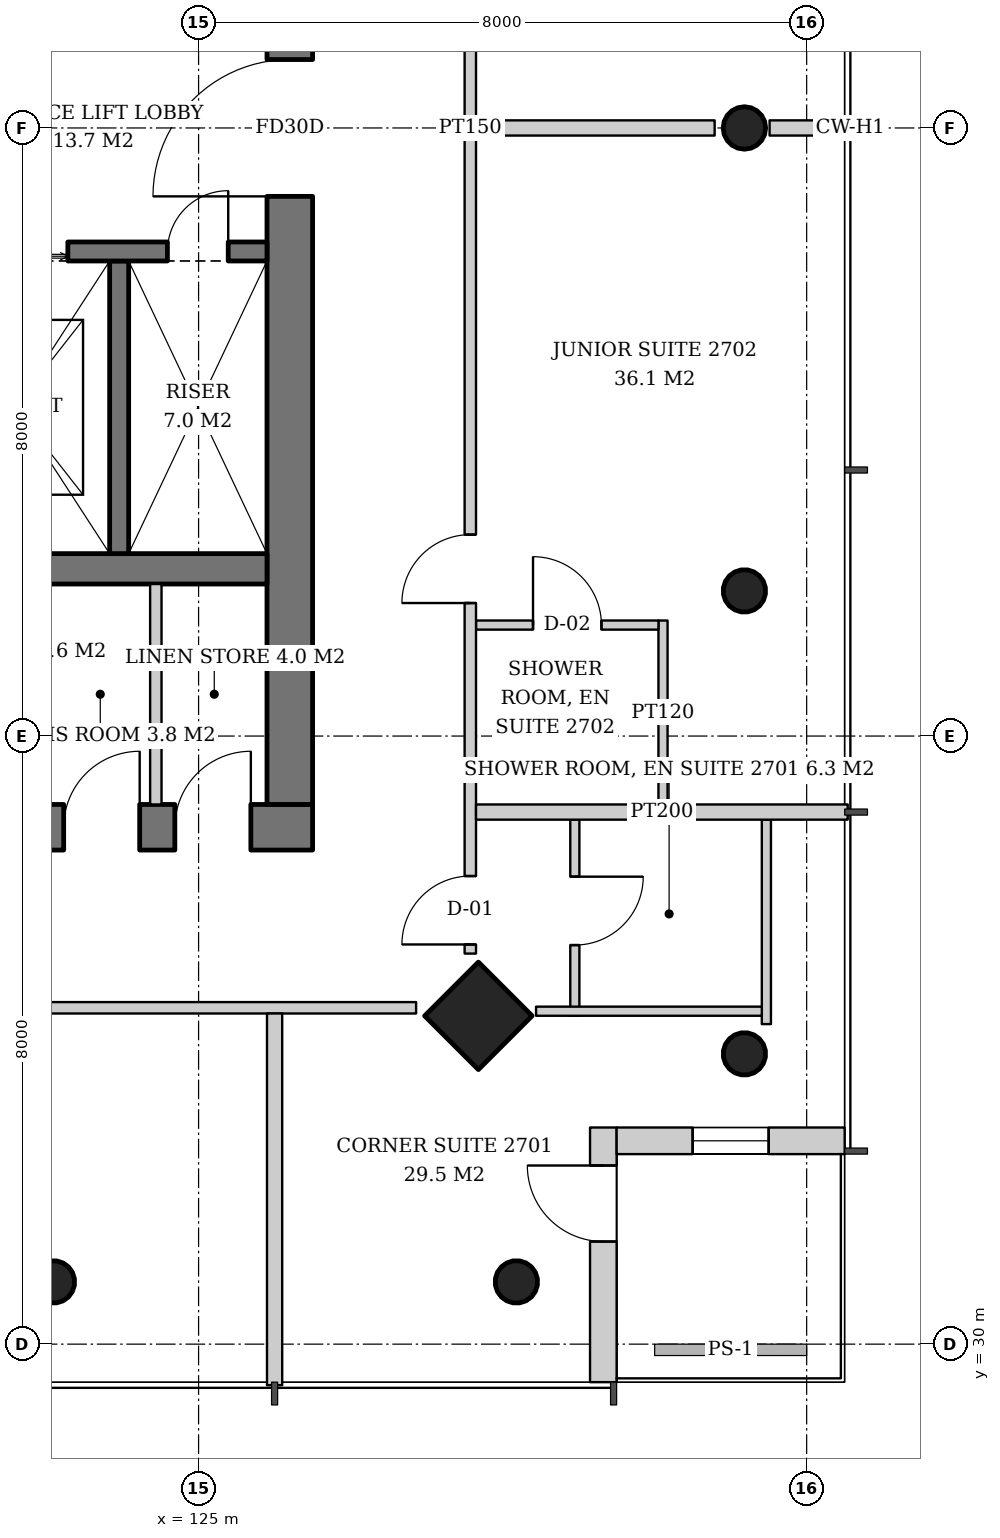
"""IFC4 building model, lengths in metres.
Left out: names, types, materials, properties, quantities, classifications, styles, units other than length and angle.
Written with IfcOpenShell. Run it as: python <this file> out.ifc"""

import sys

from ifc_helpers import new_model, si_unit, direction, frame, frame_2d, origin, origin_2d, place, context, subcontext, project, spatial, rectangle, hollow_circle, extrude, element, fill, save


model = new_model("IFC4")
c1 = context("Model", 3, precision=1e-05, world=origin(), true_north=direction((0.0, 1.0)))
c2 = subcontext(c1, "Body", "Model", "MODEL_VIEW")
j1 = project(units=[si_unit("LENGTHUNIT", "METRE"), si_unit("PLANEANGLEUNIT", "RADIAN")], contexts=[c1])
p1 = place(None, origin())
s1 = spatial("IfcSite", under=j1, at=p1, CompositionType="ELEMENT")
p2 = place(p1, origin())
s2 = spatial("IfcBuilding", under=s1, at=p2, CompositionType="ELEMENT")
p3 = place(p2, frame((0.0, 0.0, 108.4)))
s3 = spatial("IfcBuildingStorey", under=s2, at=p3, CompositionType="ELEMENT", Elevation=108.4)
p4 = place(p3, frame((132.233, 33.767, 0.0), z_axis=(-0.043029647111, 0.043029647111, 0.998146732169), x_axis=(-0.707106781187, -0.707106781187, 0.0)))
e1 = element("IfcColumn", 1, at=p4, inside=s3, PredefinedType="COLUMN", context=c2, shape_type="SweptSolid", body=[
    extrude(hollow_circle(Radius=0.28, WallThickness=0.02, at=origin_2d()), origin(), (0.0, 0.0, 1.0), 3.807),
])
p5 = place(p3, frame((132.233, 39.884, 0.0), z_axis=(-0.043059525333, 0.021561848751, 0.998839808957), x_axis=(-0.44774654769, -0.894160516368, 0.0)))
e2 = element("IfcColumn", 2, at=p5, inside=s3, PredefinedType="COLUMN", context=c2, shape_type="SweptSolid", body=[
    extrude(hollow_circle(Radius=0.28, WallThickness=0.02, at=origin_2d()), origin(), (0.0, 0.0, 1.0), 3.804),
])
p6 = place(p3, frame((132.233, 46.0, 0.0), z_axis=(-0.043069538298, 0.0, 0.999072076915), x_axis=(0.0, -1.0, 0.0)))
e3 = element("IfcColumn", 3, at=p6, inside=s3, PredefinedType="COLUMN", context=c2, shape_type="SweptSolid", body=[
    extrude(hollow_circle(Radius=0.28, WallThickness=0.02, at=origin_2d()), origin(), (0.0, 0.0, 1.0), 3.803),
])
p7 = place(p3, frame((128.733, 34.267, 0.0), z_axis=(-0.043029647111, 0.043029647111, 0.998146732169), x_axis=(-0.707106781187, -0.707106781187, 0.0)))
e4 = element("IfcColumn", 4, at=p7, inside=s3, PredefinedType="COLUMN", context=c2, shape_type="SweptSolid", body=[
    extrude(rectangle(XDim=1.0, YDim=1.0, at=origin_2d()), origin(), (0.0, 0.0, 1.0), 3.807),
])
p8 = place(p3, frame((129.233, 30.767, 0.0), z_axis=(-0.043029647111, 0.043029647111, 0.998146732169), x_axis=(-0.707106781187, -0.707106781187, 0.0)))
e5 = element("IfcColumn", 5, at=p8, inside=s3, PredefinedType="COLUMN", context=c2, shape_type="SweptSolid", body=[
    extrude(hollow_circle(Radius=0.28, WallThickness=0.02, at=origin_2d()), origin(), (0.0, 0.0, 1.0), 3.807),
])
p9 = place(p3, frame((123.116, 30.767, 0.0), z_axis=(-0.021561848751, 0.043059525333, 0.998839808957), x_axis=(-0.894160516368, -0.44774654769, 0.0)))
e6 = element("IfcColumn", 6, at=p9, inside=s3, PredefinedType="COLUMN", context=c2, shape_type="SweptSolid", body=[
    extrude(hollow_circle(Radius=0.28, WallThickness=0.02, at=origin_2d()), origin(), (0.0, 0.0, 1.0), 3.804),
])
p10 = place(p3, frame((107.5, 36.8, 0.0), z_axis=(0.0, 0.0, 1.0), x_axis=(1.0, 0.0, 0.0)))
e7 = element("IfcWall", 7, at=p10, inside=s3, PredefinedType="SHEAR", context=c2, shape_type="SweptSolid", body=[
    extrude(rectangle(XDim=19.0, YDim=0.6, at=frame_2d((9.5, 0.0))), origin(), (0.0, 0.0, 1.0), 3.8),
])
p11 = place(p10, frame((3.9, 0.0, 0.0)))
e8 = element("IfcOpeningElement", 8, at=p11, cuts=e7, PredefinedType="OPENING", context=c2, shape_type="SweptSolid", body=[
    extrude(rectangle(XDim=1.0, YDim=2.1, at=frame_2d((0.5, 1.05))), frame((0.0, 0.31, 0.0), z_axis=(0.0, -1.0, 0.0), x_axis=(1.0, 0.0, 0.0)), (0.0, 0.0, 1.0), 0.62),
])
p12 = place(p10, frame((14.153, 0.0, 0.0)))
e9 = element("IfcOpeningElement", 9, at=p12, cuts=e7, PredefinedType="OPENING", context=c2, shape_type="SweptSolid", body=[
    extrude(rectangle(XDim=1.0, YDim=2.1, at=frame_2d((0.5, 1.05))), frame((0.0, 0.31, 0.0), z_axis=(0.0, -1.0, 0.0), x_axis=(1.0, 0.0, 0.0)), (0.0, 0.0, 1.0), 0.62),
])
p13 = place(p10, frame((15.725, 0.0, 0.0)))
e10 = element("IfcOpeningElement", 10, at=p13, cuts=e7, PredefinedType="OPENING", context=c2, shape_type="SweptSolid", body=[
    extrude(rectangle(XDim=1.0, YDim=2.1, at=frame_2d((0.5, 1.05))), frame((0.0, 0.31, 0.0), z_axis=(0.0, -1.0, 0.0), x_axis=(1.0, 0.0, 0.0)), (0.0, 0.0, 1.0), 0.62),
])
p14 = place(p10, frame((17.188, 0.0, 0.0)))
e11 = element("IfcOpeningElement", 11, at=p14, cuts=e7, PredefinedType="OPENING", context=c2, shape_type="SweptSolid", body=[
    extrude(rectangle(XDim=1.0, YDim=2.1, at=frame_2d((0.5, 1.05))), frame((0.0, 0.31, 0.0), z_axis=(0.0, -1.0, 0.0), x_axis=(1.0, 0.0, 0.0)), (0.0, 0.0, 1.0), 0.62),
])
p15 = place(p3, frame((126.2, 37.1, 0.0), z_axis=(0.0, 0.0, 1.0), x_axis=(0.0, 1.0, 0.0)))
e12 = element("IfcWall", 12, at=p15, inside=s3, PredefinedType="SHEAR", context=c2, shape_type="SweptSolid", body=[
    extrude(rectangle(XDim=17.8, YDim=0.6, at=frame_2d((8.9, 0.0))), origin(), (0.0, 0.0, 1.0), 3.8),
])
p16 = place(p15, frame((8.0, 0.0, 0.0)))
e13 = element("IfcOpeningElement", 13, at=p16, cuts=e12, PredefinedType="OPENING", context=c2, shape_type="SweptSolid", body=[
    extrude(rectangle(XDim=1.8, YDim=2.4, at=frame_2d((0.9, 1.2))), frame((0.0, 0.31, 0.0), z_axis=(0.0, -1.0, 0.0), x_axis=(1.0, 0.0, 0.0)), (0.0, 0.0, 1.0), 0.62),
])
p17 = place(p3, frame((108.1, 40.2, 0.0), z_axis=(0.0, 0.0, 1.0), x_axis=(1.0, 0.0, 0.0)))
e14 = element("IfcWall", 14, at=p17, inside=s3, PredefinedType="SHEAR", context=c2, shape_type="SweptSolid", body=[
    extrude(rectangle(XDim=17.8, YDim=0.4, at=frame_2d((8.9, 0.0))), origin(), (0.0, 0.0, 1.0), 3.8),
])
p18 = place(p3, frame((130.325, 29.5, 0.0), z_axis=(0.0, 0.0, 1.0), x_axis=(0.0, 1.0, 0.0)))
e15 = element("IfcWall", 15, at=p18, inside=s3, PredefinedType="SOLIDWALL", context=c2, shape_type="SweptSolid", body=[
    extrude(rectangle(XDim=3.35, YDim=0.35, at=frame_2d((1.675, 0.0))), origin(), (0.0, 0.0, 1.0), 3.6),
])
p19 = place(p18, frame((1.85, 0.0, 0.0)))
e16 = element("IfcOpeningElement", 16, at=p19, cuts=e15, PredefinedType="OPENING", context=c2, shape_type="SweptSolid", body=[
    extrude(rectangle(XDim=1.0, YDim=2.4, at=frame_2d((0.5, 1.2))), frame((0.0, 0.185, 0.0), z_axis=(0.0, -1.0, 0.0), x_axis=(1.0, 0.0, 0.0)), (0.0, 0.0, 1.0), 0.37),
])
p20 = place(p3, frame((130.5, 32.675, 0.0), z_axis=(0.0, 0.0, 1.0), x_axis=(1.0, 0.0, 0.0)))
e17 = element("IfcWall", 17, at=p20, inside=s3, PredefinedType="SOLIDWALL", context=c2, shape_type="SweptSolid", body=[
    extrude(rectangle(XDim=3.0, YDim=0.35, at=frame_2d((1.5, 0.0))), origin(), (0.0, 0.0, 1.0), 3.6),
])
p21 = place(p20, frame((1.0, 0.0, 0.9)))
e18 = element("IfcOpeningElement", 18, at=p21, cuts=e17, PredefinedType="OPENING", context=c2, shape_type="SweptSolid", body=[
    extrude(rectangle(XDim=1.0, YDim=2.4, at=frame_2d((0.5, 1.2))), frame((0.0, 0.185, 0.0), z_axis=(0.0, -1.0, 0.0), x_axis=(1.0, 0.0, 0.0)), (0.0, 0.0, 1.0), 0.37),
])
p22 = place(p3, frame((123.955, 44.25, 0.0), z_axis=(0.0, 0.0, 1.0), x_axis=(0.0, -1.0, 0.0)))
e19 = element("IfcWall", 19, at=p22, inside=s3, PredefinedType="SHEAR", context=c2, shape_type="SweptSolid", body=[
    extrude(rectangle(XDim=3.85, YDim=0.25, at=frame_2d((1.925, 0.0))), origin(), (0.0, 0.0, 1.0), 3.8),
])
p23 = place(p3, frame((121.33, 44.375, 0.0), z_axis=(0.0, 0.0, 1.0), x_axis=(1.0, 0.0, 0.0)))
e20 = element("IfcWall", 20, at=p23, inside=s3, PredefinedType="SHEAR", context=c2, shape_type="SweptSolid", body=[
    extrude(rectangle(XDim=4.57, YDim=0.25, at=frame_2d((2.285, 0.0))), origin(), (0.0, 0.0, 1.0), 3.8),
])
p24 = place(p23, frame((0.55, 0.0, 0.0)))
e21 = element("IfcOpeningElement", 21, at=p24, cuts=e20, PredefinedType="OPENING", context=c2, shape_type="SweptSolid", body=[
    extrude(rectangle(XDim=1.4, YDim=2.4, at=frame_2d((0.7, 1.2))), frame((0.0, 0.135, 0.0), z_axis=(0.0, -1.0, 0.0), x_axis=(1.0, 0.0, 0.0)), (0.0, 0.0, 1.0), 0.27),
])
p25 = place(p23, frame((3.26, 0.0, 0.0)))
e22 = element("IfcOpeningElement", 22, at=p25, cuts=e20, PredefinedType="OPENING", context=c2, shape_type="SweptSolid", body=[
    extrude(rectangle(XDim=0.8, YDim=2.0, at=frame_2d((0.4, 1.0))), frame((0.0, 0.135, 0.0), z_axis=(0.0, -1.0, 0.0), x_axis=(1.0, 0.0, 0.0)), (0.0, 0.0, 1.0), 0.27),
])
p26 = place(p3, frame((124.438, 37.1, 0.0), z_axis=(0.0, 0.0, 1.0), x_axis=(0.0, 1.0, 0.0)))
e23 = element("IfcWall", 23, at=p26, inside=s3, PredefinedType="SOLIDWALL", context=c2, shape_type="SweptSolid", body=[
    extrude(rectangle(XDim=2.9, YDim=0.15, at=frame_2d((1.45, 0.0))), origin(), (0.0, 0.0, 1.0), 3.6),
])
p27 = place(p3, frame((129.95, 36.9, 0.0), z_axis=(0.0, 0.0, 1.0), x_axis=(0.0, -1.0, 0.0)))
e24 = element("IfcWall", 24, at=p27, inside=s3, PredefinedType="PARTITIONING", context=c2, shape_type="SweptSolid", body=[
    extrude(rectangle(XDim=2.58, YDim=0.12, at=frame_2d((1.29, 0.0))), origin(), (0.0, 0.0, 1.0), 2.9),
])
p28 = place(p27, frame((0.75, 0.0, 0.0)))
e25 = element("IfcOpeningElement", 25, at=p28, cuts=e24, PredefinedType="OPENING", context=c2, shape_type="SweptSolid", body=[
    extrude(rectangle(XDim=0.9, YDim=2.1, at=frame_2d((0.45, 1.05))), frame((0.0, 0.07, 0.0), z_axis=(0.0, -1.0, 0.0), x_axis=(1.0, 0.0, 0.0)), (0.0, 0.0, 1.0), 0.14),
])
p29 = place(p3, frame((132.47, 36.9, 0.0), z_axis=(0.0, 0.0, 1.0), x_axis=(0.0, -1.0, 0.0)))
e26 = element("IfcWall", 26, at=p29, inside=s3, PredefinedType="PARTITIONING", context=c2, shape_type="SweptSolid", body=[
    extrude(rectangle(XDim=2.689, YDim=0.12, at=frame_2d((1.345, 0.0))), origin(), (0.0, 0.0, 1.0), 3.6),
])
p30 = place(p3, frame((129.44, 34.38, 0.0), z_axis=(0.0, 0.0, 1.0), x_axis=(1.0, 0.0, 0.0)))
e27 = element("IfcWall", 27, at=p30, inside=s3, PredefinedType="PARTITIONING", context=c2, shape_type="SweptSolid", body=[
    extrude(rectangle(XDim=2.97, YDim=0.12, at=frame_2d((1.485, 0.0))), origin(), (0.0, 0.0, 1.0), 3.2),
])
p31 = place(p3, frame((131.11, 37.1, 0.0), z_axis=(0.0, 0.0, 1.0), x_axis=(0.0, 1.0, 0.0)))
e28 = element("IfcWall", 28, at=p31, inside=s3, PredefinedType="PARTITIONING", context=c2, shape_type="SweptSolid", body=[
    extrude(rectangle(XDim=2.42, YDim=0.12, at=frame_2d((1.21, 0.0))), origin(), (0.0, 0.0, 1.0), 3.6),
])
p32 = place(p3, frame((128.65, 39.46, 0.0), z_axis=(0.0, 0.0, 1.0), x_axis=(1.0, 0.0, 0.0)))
e29 = element("IfcWall", 29, at=p32, inside=s3, PredefinedType="PARTITIONING", context=c2, shape_type="SweptSolid", body=[
    extrude(rectangle(XDim=2.4, YDim=0.12, at=frame_2d((1.2, 0.0))), origin(), (0.0, 0.0, 1.0), 3.6),
])
p33 = place(p32, frame((0.75, 0.0, 0.0)))
e30 = element("IfcOpeningElement", 30, at=p33, cuts=e29, PredefinedType="OPENING", context=c2, shape_type="SweptSolid", body=[
    extrude(rectangle(XDim=0.9, YDim=2.1, at=frame_2d((0.45, 1.05))), frame((0.0, 0.07, 0.0), z_axis=(0.0, -1.0, 0.0), x_axis=(1.0, 0.0, 0.0)), (0.0, 0.0, 1.0), 0.14),
])
p34 = place(p3, frame((128.575, 35.138, 0.0), z_axis=(0.0, 0.0, 1.0), x_axis=(0.0, 1.0, 0.0)))
e31 = element("IfcWall", 31, at=p34, inside=s3, PredefinedType="PARTITIONING", context=c2, shape_type="SweptSolid", body=[
    extrude(rectangle(XDim=21.724, YDim=0.15, at=frame_2d((10.862, 0.0))), origin(), (0.0, 0.0, 1.0), 2.9),
])
p35 = place(p34, frame((0.12, 0.0, 0.0)))
e32 = element("IfcOpeningElement", 32, at=p35, cuts=e31, PredefinedType="OPENING", context=c2, shape_type="SweptSolid", body=[
    extrude(rectangle(XDim=0.9, YDim=2.1, at=frame_2d((0.45, 1.05))), frame((0.0, 0.085, 0.0), z_axis=(0.0, -1.0, 0.0), x_axis=(1.0, 0.0, 0.0)), (0.0, 0.0, 1.0), 0.17),
])
p36 = place(p34, frame((4.612, 0.0, 0.0)))
e33 = element("IfcOpeningElement", 33, at=p36, cuts=e31, PredefinedType="OPENING", context=c2, shape_type="SweptSolid", body=[
    extrude(rectangle(XDim=0.9, YDim=2.1, at=frame_2d((0.45, 1.05))), frame((0.0, 0.085, 0.0), z_axis=(0.0, -1.0, 0.0), x_axis=(1.0, 0.0, 0.0)), (0.0, 0.0, 1.0), 0.17),
])
p37 = place(p34, frame((13.562, 0.0, 0.0)))
e34 = element("IfcOpeningElement", 34, at=p37, cuts=e31, PredefinedType="OPENING", context=c2, shape_type="SweptSolid", body=[
    extrude(rectangle(XDim=1.0, YDim=2.1, at=frame_2d((0.5, 1.05))), frame((0.0, 0.085, 0.0), z_axis=(0.0, -1.0, 0.0), x_axis=(1.0, 0.0, 0.0)), (0.0, 0.0, 1.0), 0.17),
])
p38 = place(p3, frame((128.65, 37.0, 0.0), z_axis=(0.0, 0.0, 1.0), x_axis=(1.0, 0.0, 0.0)))
e35 = element("IfcWall", 35, at=p38, inside=s3, PredefinedType="PARTITIONING", context=c2, shape_type="SweptSolid", body=[
    extrude(rectangle(XDim=4.89, YDim=0.2, at=frame_2d((2.445, 0.0))), origin(), (0.0, 0.0, 1.0), 2.9),
])
p39 = place(p3, frame((128.65, 46.0, 0.0), z_axis=(0.0, 0.0, 1.0), x_axis=(1.0, 0.0, 0.0)))
e36 = element("IfcWall", 36, at=p39, inside=s3, PredefinedType="PARTITIONING", context=c2, shape_type="SweptSolid", body=[
    extrude(rectangle(XDim=3.14, YDim=0.2, at=frame_2d((1.57, 0.0))), origin(), (0.0, 0.0, 1.0), 3.6),
])
p40 = place(p3, frame((132.512, 46.0, 0.0), z_axis=(0.0, 0.0, 1.0), x_axis=(1.0, 0.0, 0.0)))
e37 = element("IfcWall", 37, at=p40, inside=s3, PredefinedType="PARTITIONING", context=c2, shape_type="SweptSolid", body=[
    extrude(rectangle(XDim=1.028, YDim=0.2, at=frame_2d((0.514, 0.0))), origin(), (0.0, 0.0, 1.0), 3.6),
])
p41 = place(p3, frame((106.138, 34.425, 0.0), z_axis=(0.0, 0.0, 1.0), x_axis=(1.0, 0.0, 0.0)))
e38 = element("IfcWall", 38, at=p41, inside=s3, PredefinedType="PARTITIONING", context=c2, shape_type="SweptSolid", body=[
    extrude(rectangle(XDim=21.724, YDim=0.15, at=frame_2d((10.862, 0.0))), origin(), (0.0, 0.0, 1.0), 2.9),
])
p42 = place(p41, frame((0.12, 0.0, 0.0)))
e39 = element("IfcOpeningElement", 39, at=p42, cuts=e38, PredefinedType="OPENING", context=c2, shape_type="SweptSolid", body=[
    extrude(rectangle(XDim=0.9, YDim=2.1, at=frame_2d((0.45, 1.05))), frame((0.0, 0.085, 0.0), z_axis=(0.0, -1.0, 0.0), x_axis=(1.0, 0.0, 0.0)), (0.0, 0.0, 1.0), 0.17),
])
p43 = place(p41, frame((4.562, 0.0, 0.0)))
e40 = element("IfcOpeningElement", 40, at=p43, cuts=e38, PredefinedType="OPENING", context=c2, shape_type="SweptSolid", body=[
    extrude(rectangle(XDim=1.0, YDim=2.1, at=frame_2d((0.5, 1.05))), frame((0.0, 0.085, 0.0), z_axis=(0.0, -1.0, 0.0), x_axis=(1.0, 0.0, 0.0)), (0.0, 0.0, 1.0), 0.17),
])
p44 = place(p41, frame((13.612, 0.0, 0.0)))
e41 = element("IfcOpeningElement", 41, at=p44, cuts=e38, PredefinedType="OPENING", context=c2, shape_type="SweptSolid", body=[
    extrude(rectangle(XDim=0.9, YDim=2.1, at=frame_2d((0.45, 1.05))), frame((0.0, 0.085, 0.0), z_axis=(0.0, -1.0, 0.0), x_axis=(1.0, 0.0, 0.0)), (0.0, 0.0, 1.0), 0.17),
])
p45 = place(p3, frame((126.0, 34.35, 0.0), z_axis=(0.0, 0.0, 1.0), x_axis=(0.0, -1.0, 0.0)))
e42 = element("IfcWall", 42, at=p45, inside=s3, PredefinedType="PARTITIONING", context=c2, shape_type="SweptSolid", body=[
    extrude(rectangle(XDim=4.89, YDim=0.2, at=frame_2d((2.445, 0.0))), origin(), (0.0, 0.0, 1.0), 3.2),
])
p46 = place(p19, origin())
e43 = element("IfcDoor", 43, at=p46, inside=s3, OperationType="SINGLE_SWING_RIGHT", PredefinedType="DOOR", context=c2, shape_type="SweptSolid", body=[
    extrude(rectangle(XDim=1.0, YDim=2.4, at=frame_2d((0.5, 1.2))), frame((0.0, 0.025, 0.0), z_axis=(0.0, -1.0, 0.0), x_axis=(1.0, 0.0, 0.0)), (0.0, 0.0, 1.0), 0.05),
])
fill(e16, e43)
p47 = place(p21, origin())
e44 = element("IfcWindow", 44, at=p47, inside=s3, PartitioningType="SINGLE_PANEL", PredefinedType="WINDOW", context=c2, shape_type="SweptSolid", body=[
    extrude(rectangle(XDim=1.0, YDim=2.4, at=frame_2d((0.5, 1.2))), frame((0.0, 0.03, 0.0), z_axis=(0.0, -1.0, 0.0), x_axis=(1.0, 0.0, 0.0)), (0.0, 0.0, 1.0), 0.06),
])
fill(e18, e44)
p48 = place(p24, origin())
e45 = element("IfcDoor", 45, at=p48, inside=s3, OperationType="DOUBLE_DOOR_SLIDING", PredefinedType="DOOR", context=c2, shape_type="SweptSolid", body=[
    extrude(rectangle(XDim=1.4, YDim=2.4, at=frame_2d((0.7, 1.2))), frame((0.0, 0.025, 0.0), z_axis=(0.0, -1.0, 0.0), x_axis=(1.0, 0.0, 0.0)), (0.0, 0.0, 1.0), 0.05),
])
fill(e21, e45)
p49 = place(p25, origin())
e46 = element("IfcDoor", 46, at=p49, inside=s3, OperationType="SINGLE_SWING_RIGHT", PredefinedType="DOOR", context=c2, shape_type="SweptSolid", body=[
    extrude(rectangle(XDim=0.8, YDim=2.0, at=frame_2d((0.4, 1.0))), frame((0.0, 0.025, 0.0), z_axis=(0.0, -1.0, 0.0), x_axis=(1.0, 0.0, 0.0)), (0.0, 0.0, 1.0), 0.05),
])
fill(e22, e46)
p50 = place(p16, origin())
e47 = element("IfcDoor", 47, at=p50, inside=s3, OperationType="DOUBLE_DOOR_SINGLE_SWING", PredefinedType="DOOR", context=c2, shape_type="SweptSolid", body=[
    extrude(rectangle(XDim=1.8, YDim=2.4, at=frame_2d((0.9, 1.2))), frame((0.0, 0.025, 0.0), z_axis=(0.0, -1.0, 0.0), x_axis=(1.0, 0.0, 0.0)), (0.0, 0.0, 1.0), 0.05),
])
fill(e13, e47)
p51 = place(p13, origin())
e48 = element("IfcDoor", 48, at=p51, inside=s3, OperationType="SINGLE_SWING_RIGHT", PredefinedType="DOOR", context=c2, shape_type="SweptSolid", body=[
    extrude(rectangle(XDim=1.0, YDim=2.1, at=frame_2d((0.5, 1.05))), frame((0.0, 0.29, 0.0), z_axis=(0.0, -1.0, 0.0), x_axis=(1.0, 0.0, 0.0)), (0.0, 0.0, 1.0), 0.05),
])
fill(e10, e48)
p52 = place(p14, origin())
e49 = element("IfcDoor", 49, at=p52, inside=s3, OperationType="SINGLE_SWING_RIGHT", PredefinedType="DOOR", context=c2, shape_type="SweptSolid", body=[
    extrude(rectangle(XDim=1.0, YDim=2.1, at=frame_2d((0.5, 1.05))), frame((0.0, 0.29, 0.0), z_axis=(0.0, -1.0, 0.0), x_axis=(1.0, 0.0, 0.0)), (0.0, 0.0, 1.0), 0.05),
])
fill(e11, e49)
p53 = place(p28, origin())
e50 = element("IfcDoor", 50, at=p53, inside=s3, OperationType="SINGLE_SWING_LEFT", PredefinedType="DOOR", context=c2, shape_type="SweptSolid", body=[
    extrude(rectangle(XDim=0.9, YDim=2.1, at=frame_2d((0.45, 1.05))), frame((0.0, 0.025, 0.0), z_axis=(0.0, -1.0, 0.0), x_axis=(1.0, 0.0, 0.0)), (0.0, 0.0, 1.0), 0.05),
])
fill(e25, e50)
p54 = place(p33, origin())
e51 = element("IfcDoor", 51, at=p54, inside=s3, OperationType="SINGLE_SWING_LEFT", PredefinedType="DOOR", context=c2, shape_type="SweptSolid", body=[
    extrude(rectangle(XDim=0.9, YDim=2.1, at=frame_2d((0.45, 1.05))), frame((0.0, 0.025, 0.0), z_axis=(0.0, -1.0, 0.0), x_axis=(1.0, 0.0, 0.0)), (0.0, 0.0, 1.0), 0.05),
])
fill(e30, e51)
p55 = place(p35, origin())
e52 = element("IfcDoor", 52, at=p55, inside=s3, OperationType="SINGLE_SWING_LEFT", PredefinedType="DOOR", context=c2, shape_type="SweptSolid", body=[
    extrude(rectangle(XDim=0.9, YDim=2.1, at=frame_2d((0.45, 1.05))), frame((0.0, 0.025, 0.0), z_axis=(0.0, -1.0, 0.0), x_axis=(1.0, 0.0, 0.0)), (0.0, 0.0, 1.0), 0.05),
])
fill(e32, e52)
p56 = place(p36, origin())
e53 = element("IfcDoor", 53, at=p56, inside=s3, OperationType="SINGLE_SWING_LEFT", PredefinedType="DOOR", context=c2, shape_type="SweptSolid", body=[
    extrude(rectangle(XDim=0.9, YDim=2.1, at=frame_2d((0.45, 1.05))), frame((0.0, 0.025, 0.0), z_axis=(0.0, -1.0, 0.0), x_axis=(1.0, 0.0, 0.0)), (0.0, 0.0, 1.0), 0.05),
])
fill(e33, e53)
save(model, sys.argv[1])
